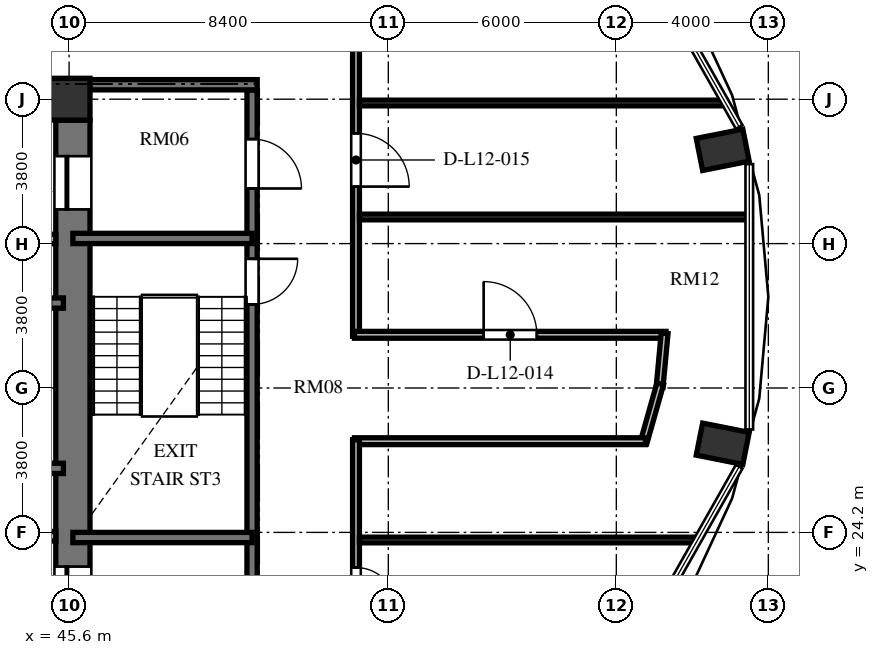
"""IFC4 building model, lengths in metres.
Left out: names, types, materials, properties, quantities, classifications, styles, units other than length and angle.
Written with IfcOpenShell. Run it as: python <this file> out.ifc"""

import sys

from ifc_helpers import new_model, si_unit, direction, frame, frame_2d, origin, origin_2d, place, context, subcontext, project, spatial, rectangle, extrude, element, fill, save


model = new_model("IFC4")
c1 = context("Model", 3, precision=1e-05, world=origin(), true_north=direction((0.0, 1.0)))
c2 = subcontext(c1, "Body", "Model", "MODEL_VIEW")
j1 = project(units=[si_unit("LENGTHUNIT", "METRE"), si_unit("PLANEANGLEUNIT", "RADIAN")], contexts=[c1])
p1 = place(None, origin())
s1 = spatial("IfcSite", under=j1, at=p1, CompositionType="ELEMENT")
p2 = place(p1, origin())
s2 = spatial("IfcBuilding", under=s1, at=p2, CompositionType="ELEMENT")
p3 = place(p2, frame((0.0, 0.0, 50.736)))
s3 = spatial("IfcBuildingStorey", under=s2, at=p3, CompositionType="ELEMENT", Elevation=50.736)
for number, where, z_axis, x_axis in (
    (1, (62.8, 26.532, 0.0), (0.0, 0.0, 1.0), (0.981, -0.195, 0.0)),
    (2, (62.8, 34.268, 0.0), (0.0, 0.0, 1.0), (0.981, 0.195, 0.0)),
):
    element("IfcColumn", number, at=place(p3, frame(where, z_axis=z_axis, x_axis=x_axis)), inside=s3, PredefinedType="COLUMN", context=c2, shape_type="SweptSolid", body=[
        extrude(rectangle(XDim=1.25, YDim=0.86, at=origin_2d()), origin(), (0.0, 0.0, 1.0), 3.648),
    ])
p4 = place(p3, frame((45.6, 35.6, 0.0), z_axis=(0.0, 0.0, 1.0), x_axis=(1.0, 0.0, 0.0)))
e3 = element("IfcColumn", 3, at=p4, inside=s3, PredefinedType="COLUMN", context=c2, shape_type="SweptSolid", body=[
    extrude(rectangle(XDim=1.1, YDim=1.1, at=origin_2d()), origin(), (0.0, 0.0, 1.0), 3.648),
])
p5 = place(p3, frame((45.7, 20.95, 0.0), z_axis=(0.0, 0.0, 1.0), x_axis=(0.0, 1.0, 0.0)))
e4 = element("IfcWall", 4, at=p5, inside=s3, PredefinedType="SHEAR", context=c2, shape_type="SweptSolid", body=[
    extrude(rectangle(XDim=14.1, YDim=0.9, at=frame_2d((7.05, 0.0))), origin(), (0.0, 0.0, 1.0), 3.648),
])
p6 = place(p5, frame((11.75, 0.0, 0.0)))
e5 = element("IfcOpeningElement", 5, at=p6, cuts=e4, PredefinedType="OPENING", context=c2, shape_type="SweptSolid", body=[
    extrude(rectangle(XDim=1.4, YDim=2.3, at=frame_2d((0.7, 1.15))), frame((0.0, 0.46, 0.0), z_axis=(0.0, -1.0, 0.0), x_axis=(1.0, 0.0, 0.0)), (0.0, 0.0, 1.0), 0.92),
])
p7 = place(p5, frame((0.95, 0.0, 0.0)))
e6 = element("IfcOpeningElement", 6, at=p7, cuts=e4, PredefinedType="OPENING", context=c2, shape_type="SweptSolid", body=[
    extrude(rectangle(XDim=1.4, YDim=2.3, at=frame_2d((0.7, 1.15))), frame((0.0, 0.46, 0.0), z_axis=(0.0, -1.0, 0.0), x_axis=(1.0, 0.0, 0.0)), (0.0, 0.0, 1.0), 0.92),
])
p8 = place(p3, frame((37.465, 30.235, 0.0), z_axis=(0.0, 0.0, 1.0), x_axis=(1.0, 0.0, 0.0)))
e7 = element("IfcWall", 7, at=p8, inside=s3, PredefinedType="SHEAR", context=c2, shape_type="SweptSolid", body=[
    extrude(rectangle(XDim=7.985, YDim=0.27, at=frame_2d((3.992, 0.0))), origin(), (0.0, 0.0, 1.0), 3.648),
])
p9 = place(p8, frame((6.455, 0.0, 0.0)))
e8 = element("IfcOpeningElement", 8, at=p9, cuts=e7, PredefinedType="OPENING", context=c2, shape_type="SweptSolid", body=[
    extrude(rectangle(XDim=1.2, YDim=2.15, at=frame_2d((0.6, 1.075))), frame((0.0, 0.145, 0.0), z_axis=(0.0, -1.0, 0.0), x_axis=(1.0, 0.0, 0.0)), (0.0, 0.0, 1.0), 0.29),
])
p10 = place(p3, frame((37.465, 25.885, 0.0), z_axis=(0.0, 0.0, 1.0), x_axis=(1.0, 0.0, 0.0)))
e9 = element("IfcWall", 9, at=p10, inside=s3, PredefinedType="SHEAR", context=c2, shape_type="SweptSolid", body=[
    extrude(rectangle(XDim=7.985, YDim=0.27, at=frame_2d((3.992, 0.0))), origin(), (0.0, 0.0, 1.0), 3.648),
])
for number, where, z_axis, x_axis in (
    (10, (42.95, 31.92, 0.0), (0.0, 0.0, 1.0), (1.0, 0.0, 0.0)),
    (11, (42.95, 24.1, 0.0), (0.0, 0.0, 1.0), (1.0, 0.0, 0.0)),
):
    element("IfcWall", number, at=place(p3, frame(where, z_axis=z_axis, x_axis=x_axis)), inside=s3, PredefinedType="SOLIDWALL", context=c2, shape_type="SweptSolid", body=[
        extrude(rectangle(XDim=2.3, YDim=0.25, at=frame_2d((1.15, 0.0))), origin(), (0.0, 0.0, 1.0), 3.428),
    ])
p11 = place(p3, frame((50.415, 35.845, 0.0), z_axis=(0.0, 0.0, 1.0), x_axis=(0.0, -1.0, 0.0)))
e12 = element("IfcWall", 12, at=p11, inside=s3, PredefinedType="SHEAR", context=c2, shape_type="SweptSolid", body=[
    extrude(rectangle(XDim=15.825, YDim=0.27, at=frame_2d((7.913, 0.0))), origin(), (0.0, 0.0, 1.0), 3.648),
])
p12 = place(p11, frame((4.445, 0.0, 0.0)))
e13 = element("IfcOpeningElement", 13, at=p12, cuts=e12, PredefinedType="OPENING", context=c2, shape_type="SweptSolid", body=[
    extrude(rectangle(XDim=1.2, YDim=2.15, at=frame_2d((0.6, 1.075))), frame((0.0, 0.145, 0.0), z_axis=(0.0, -1.0, 0.0), x_axis=(1.0, 0.0, 0.0)), (0.0, 0.0, 1.0), 0.29),
])
p13 = place(p11, frame((1.295, 0.0, 0.0)))
e14 = element("IfcOpeningElement", 14, at=p13, cuts=e12, PredefinedType="OPENING", context=c2, shape_type="SweptSolid", body=[
    extrude(rectangle(XDim=1.3, YDim=2.2, at=frame_2d((0.65, 1.1))), frame((0.0, 0.145, 0.0), z_axis=(0.0, -1.0, 0.0), x_axis=(1.0, 0.0, 0.0)), (0.0, 0.0, 1.0), 0.29),
])
p14 = place(p11, frame((13.095, 0.0, 0.0)))
e15 = element("IfcOpeningElement", 15, at=p14, cuts=e12, PredefinedType="OPENING", context=c2, shape_type="SweptSolid", body=[
    extrude(rectangle(XDim=1.3, YDim=2.2, at=frame_2d((0.65, 1.1))), frame((0.0, 0.145, 0.0), z_axis=(0.0, -1.0, 0.0), x_axis=(1.0, 0.0, 0.0)), (0.0, 0.0, 1.0), 0.29),
])
p15 = place(p3, frame((46.15, 35.98, 0.0), z_axis=(0.0, 0.0, 1.0), x_axis=(1.0, 0.0, 0.0)))
e16 = element("IfcWall", 16, at=p15, inside=s3, PredefinedType="SHEAR", context=c2, shape_type="SweptSolid", body=[
    extrude(rectangle(XDim=4.4, YDim=0.27, at=frame_2d((2.2, 0.0))), origin(), (0.0, 0.0, 1.0), 3.648),
])
for number, where, z_axis, x_axis in (
    (17, (45.7, 31.935, 0.0), (0.0, 0.0, 1.0), (1.0, 0.0, 0.0)),
    (18, (45.7, 24.065, 0.0), (0.0, 0.0, 1.0), (1.0, 0.0, 0.0)),
):
    element("IfcWall", number, at=place(p3, frame(where, z_axis=z_axis, x_axis=x_axis)), inside=s3, PredefinedType="SHEAR", context=c2, shape_type="SweptSolid", body=[
        extrude(rectangle(XDim=4.715, YDim=0.27, at=frame_2d((2.357, 0.0))), origin(), (0.0, 0.0, 1.0), 3.648),
    ])
p16 = place(p3, frame((53.15, 38.79, 0.0), z_axis=(0.0, 0.0, 1.0), x_axis=(0.0, -1.0, 0.0)))
e19 = element("IfcWall", 19, at=p16, inside=s3, PredefinedType="PARTITIONING", context=c2, shape_type="SweptSolid", body=[
    extrude(rectangle(XDim=9.43, YDim=0.18, at=frame_2d((4.715, 0.0))), origin(), (0.0, 0.0, 1.0), 3.428),
])
p17 = place(p16, frame((4.09, 0.0, 0.0)))
e20 = element("IfcOpeningElement", 20, at=p17, cuts=e19, PredefinedType="OPENING", context=c2, shape_type="SweptSolid", body=[
    extrude(rectangle(XDim=1.4, YDim=2.2, at=frame_2d((0.7, 1.1))), frame((0.0, 0.1, 0.0), z_axis=(0.0, -1.0, 0.0), x_axis=(1.0, 0.0, 0.0)), (0.0, 0.0, 1.0), 0.2),
])
p18 = place(p3, frame((53.11, 29.4, 0.0), z_axis=(0.0, 0.0, 1.0), x_axis=(1.0, 0.0, 0.0)))
e21 = element("IfcWall", 21, at=p18, inside=s3, PredefinedType="PARTITIONING", context=c2, shape_type="SweptSolid", body=[
    extrude(rectangle(XDim=8.197, YDim=0.18, at=frame_2d((4.098, 0.0))), origin(), (0.0, 0.0, 1.0), 3.428),
])
p19 = place(p18, frame((3.398, 0.0, 0.0)))
e22 = element("IfcOpeningElement", 22, at=p19, cuts=e21, PredefinedType="OPENING", context=c2, shape_type="SweptSolid", body=[
    extrude(rectangle(XDim=1.4, YDim=2.2, at=frame_2d((0.7, 1.1))), frame((0.0, 0.1, 0.0), z_axis=(0.0, -1.0, 0.0), x_axis=(1.0, 0.0, 0.0)), (0.0, 0.0, 1.0), 0.2),
])
p20 = place(p3, frame((61.271, 29.44, 0.0), z_axis=(0.0, 0.0, 1.0), x_axis=(-0.092539930621, -0.995708974169, 0.0)))
e23 = element("IfcWall", 23, at=p20, inside=s3, PredefinedType="PARTITIONING", context=c2, shape_type="SweptSolid", body=[
    extrude(rectangle(XDim=1.417, YDim=0.18, at=frame_2d((0.708, 0.0))), origin(), (0.0, 0.0, 1.0), 3.428),
])
p21 = place(p3, frame((61.154, 28.107, 0.0), z_axis=(0.0, 0.0, 1.0), x_axis=(-0.271748942561, -0.962368179138, 0.0)))
e24 = element("IfcWall", 24, at=p21, inside=s3, PredefinedType="PARTITIONING", context=c2, shape_type="SweptSolid", body=[
    extrude(rectangle(XDim=1.606, YDim=0.18, at=frame_2d((0.803, 0.0))), origin(), (0.0, 0.0, 1.0), 3.428),
])
p22 = place(p3, frame((60.768, 26.6, 0.0), z_axis=(0.0, 0.0, 1.0), x_axis=(-1.0, 0.0, 0.0)))
e25 = element("IfcWall", 25, at=p22, inside=s3, PredefinedType="PARTITIONING", context=c2, shape_type="SweptSolid", body=[
    extrude(rectangle(XDim=7.658, YDim=0.18, at=frame_2d((3.829, 0.0))), origin(), (0.0, 0.0, 1.0), 3.428),
])
p23 = place(p3, frame((53.15, 26.64, 0.0), z_axis=(0.0, 0.0, 1.0), x_axis=(0.0, -1.0, 0.0)))
e26 = element("IfcWall", 26, at=p23, inside=s3, PredefinedType="PARTITIONING", context=c2, shape_type="SweptSolid", body=[
    extrude(rectangle(XDim=6.66, YDim=0.18, at=frame_2d((3.33, 0.0))), origin(), (0.0, 0.0, 1.0), 3.428),
])
p24 = place(p23, frame((3.365, 0.0, 0.0)))
e27 = element("IfcOpeningElement", 27, at=p24, cuts=e26, PredefinedType="OPENING", context=c2, shape_type="SweptSolid", body=[
    extrude(rectangle(XDim=1.05, YDim=2.15, at=frame_2d((0.525, 1.075))), frame((0.0, 0.1, 0.0), z_axis=(0.0, -1.0, 0.0), x_axis=(1.0, 0.0, 0.0)), (0.0, 0.0, 1.0), 0.2),
])
p25 = place(p3, frame((53.24, 24.0, 0.0), z_axis=(0.0, 0.0, 1.0), x_axis=(1.0, 0.0, 0.0)))
e28 = element("IfcWall", 28, at=p25, inside=s3, PredefinedType="PARTITIONING", context=c2, shape_type="SweptSolid", body=[
    extrude(rectangle(XDim=8.895, YDim=0.15, at=frame_2d((4.448, 0.0))), origin(), (0.0, 0.0, 1.0), 3.428),
])
p26 = place(p3, frame((53.24, 32.5, 0.0), z_axis=(0.0, 0.0, 1.0), x_axis=(1.0, 0.0, 0.0)))
e29 = element("IfcWall", 29, at=p26, inside=s3, PredefinedType="PARTITIONING", context=c2, shape_type="SweptSolid", body=[
    extrude(rectangle(XDim=10.252, YDim=0.15, at=frame_2d((5.126, 0.0))), origin(), (0.0, 0.0, 1.0), 3.428),
])
p27 = place(p3, frame((53.24, 35.5, 0.0), z_axis=(0.0, 0.0, 1.0), x_axis=(1.0, 0.0, 0.0)))
e30 = element("IfcWall", 30, at=p27, inside=s3, PredefinedType="PARTITIONING", context=c2, shape_type="SweptSolid", body=[
    extrude(rectangle(XDim=9.632, YDim=0.15, at=frame_2d((4.816, 0.0))), origin(), (0.0, 0.0, 1.0), 3.428),
])
p28 = place(p6, origin())
e31 = element("IfcDoor", 31, at=p28, inside=s3, OperationType="SLIDING_TO_LEFT", PredefinedType="DOOR", context=c2, shape_type="SweptSolid", body=[
    extrude(rectangle(XDim=1.4, YDim=2.3, at=frame_2d((0.7, 1.15))), frame((0.0, 0.025, 0.0), z_axis=(0.0, -1.0, 0.0), x_axis=(1.0, 0.0, 0.0)), (0.0, 0.0, 1.0), 0.05),
])
fill(e5, e31)
p29 = place(p7, origin())
e32 = element("IfcDoor", 32, at=p29, inside=s3, OperationType="SLIDING_TO_LEFT", PredefinedType="DOOR", context=c2, shape_type="SweptSolid", body=[
    extrude(rectangle(XDim=1.4, YDim=2.3, at=frame_2d((0.7, 1.15))), frame((0.0, 0.025, 0.0), z_axis=(0.0, -1.0, 0.0), x_axis=(1.0, 0.0, 0.0)), (0.0, 0.0, 1.0), 0.05),
])
fill(e6, e32)
p30 = place(p12, origin())
e33 = element("IfcDoor", 33, at=p30, inside=s3, OperationType="SINGLE_SWING_LEFT", PredefinedType="DOOR", context=c2, shape_type="SweptSolid", body=[
    extrude(rectangle(XDim=1.2, YDim=2.15, at=frame_2d((0.6, 1.075))), frame((0.0, 0.025, 0.0), z_axis=(0.0, -1.0, 0.0), x_axis=(1.0, 0.0, 0.0)), (0.0, 0.0, 1.0), 0.05),
])
fill(e13, e33)
p31 = place(p13, origin())
e34 = element("IfcDoor", 34, at=p31, inside=s3, OperationType="SINGLE_SWING_RIGHT", PredefinedType="DOOR", context=c2, shape_type="SweptSolid", body=[
    extrude(rectangle(XDim=1.3, YDim=2.2, at=frame_2d((0.65, 1.1))), frame((0.0, 0.025, 0.0), z_axis=(0.0, -1.0, 0.0), x_axis=(1.0, 0.0, 0.0)), (0.0, 0.0, 1.0), 0.05),
])
fill(e14, e34)
p32 = place(p24, origin())
e35 = element("IfcDoor", 35, at=p32, inside=s3, OperationType="SINGLE_SWING_RIGHT", PredefinedType="DOOR", context=c2, shape_type="SweptSolid", body=[
    extrude(rectangle(XDim=1.05, YDim=2.15, at=frame_2d((0.525, 1.075))), frame((0.0, 0.025, 0.0), z_axis=(0.0, -1.0, 0.0), x_axis=(1.0, 0.0, 0.0)), (0.0, 0.0, 1.0), 0.05),
])
fill(e27, e35)
p33 = place(p19, origin())
e36 = element("IfcDoor", 36, at=p33, inside=s3, OperationType="SINGLE_SWING_LEFT", PredefinedType="DOOR", context=c2, shape_type="SweptSolid", body=[
    extrude(rectangle(XDim=1.4, YDim=2.2, at=frame_2d((0.7, 1.1))), frame((0.0, 0.025, 0.0), z_axis=(0.0, -1.0, 0.0), x_axis=(1.0, 0.0, 0.0)), (0.0, 0.0, 1.0), 0.05),
])
fill(e22, e36)
p34 = place(p17, origin())
e37 = element("IfcDoor", 37, at=p34, inside=s3, OperationType="SINGLE_SWING_RIGHT", PredefinedType="DOOR", context=c2, shape_type="SweptSolid", body=[
    extrude(rectangle(XDim=1.4, YDim=2.2, at=frame_2d((0.7, 1.1))), frame((0.0, 0.025, 0.0), z_axis=(0.0, -1.0, 0.0), x_axis=(1.0, 0.0, 0.0)), (0.0, 0.0, 1.0), 0.05),
])
fill(e20, e37)
save(model, sys.argv[1])
